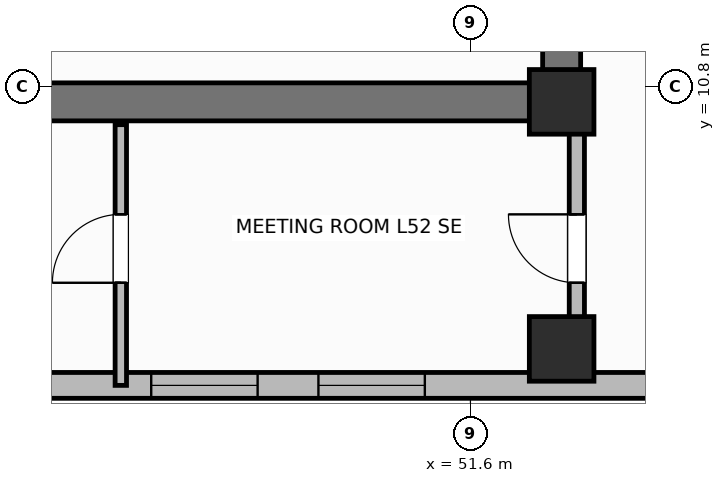
"""IFC4 building model, lengths in metres.
Left out: names, types, materials, properties, quantities, classifications, styles, units other than length and angle.
Written with IfcOpenShell. Run it as: python <this file> out.ifc"""

import sys

from ifc_helpers import new_model, si_unit, direction, frame, frame_2d, origin, origin_2d, place, context, subcontext, project, spatial, rectangle, extrude, element, fill, save


model = new_model("IFC4")
c1 = context("Model", 3, precision=1e-05, world=origin(), true_north=direction((0.0, 1.0)))
c2 = subcontext(c1, "Body", "Model", "MODEL_VIEW")
j1 = project(units=[si_unit("LENGTHUNIT", "METRE"), si_unit("PLANEANGLEUNIT", "RADIAN")], contexts=[c1])
p1 = place(None, origin())
s1 = spatial("IfcSite", under=j1, at=p1, CompositionType="ELEMENT")
p2 = place(p1, origin())
s2 = spatial("IfcBuilding", under=s1, at=p2, CompositionType="ELEMENT")
p3 = place(p2, frame((0.0, 0.0, 211.0)))
s3 = spatial("IfcBuildingStorey", under=s2, at=p3, CompositionType="ELEMENT", Elevation=211.0)
p4 = place(p3, frame((52.8, 10.6, 0.0), z_axis=(0.0, 0.0, 1.0), x_axis=(-1.0, 0.0, 0.0)))
e1 = element("IfcWall", 1, at=p4, inside=s3, PredefinedType="SHEAR", context=c2, shape_type="SweptSolid", body=[
    extrude(rectangle(XDim=27.2, YDim=0.5, at=frame_2d((13.6, 0.0))), origin(), (0.0, 0.0, 1.0), 3.7),
])
p5 = place(p3, frame((52.8, 10.85, 0.0), z_axis=(0.0, 0.0, 1.0), x_axis=(0.0, 1.0, 0.0)))
e2 = element("IfcWall", 2, at=p5, inside=s3, PredefinedType="SHEAR", context=c2, shape_type="SweptSolid", body=[
    extrude(rectangle(XDim=5.7, YDim=0.5, at=frame_2d((2.85, 0.0))), origin(), (0.0, 0.0, 1.0), 3.7),
])
for number, where, z_axis, x_axis in (
    (3, (52.8, 10.6, 0.0), (0.0, 0.0, 1.0), (1.0, 0.0, 0.0)),
    (4, (52.8, 7.35, 0.0), (0.0, 0.0, 1.0), (1.0, 0.0, 0.0)),
):
    element("IfcColumn", number, at=place(p3, frame(where, z_axis=z_axis, x_axis=x_axis)), inside=s3, PredefinedType="COLUMN", context=c2, shape_type="SweptSolid", body=[
        extrude(rectangle(XDim=0.85, YDim=0.85, at=origin_2d()), origin(), (0.0, 0.0, 1.0), 3.7),
    ])
p6 = place(p3, frame((42.4, 6.87, 0.0), z_axis=(0.0, 0.0, 1.0), x_axis=(1.0, 0.0, 0.0)))
e5 = element("IfcWall", 5, at=p6, inside=s3, PredefinedType="SOLIDWALL", context=c2, shape_type="SweptSolid", body=[
    extrude(rectangle(XDim=15.8, YDim=0.34, at=frame_2d((7.9, 0.0))), origin(), (0.0, 0.0, 1.0), 2.72),
])
p7 = place(p6, frame((2.1, 0.0, 0.75)))
e6 = element("IfcOpeningElement", 6, at=p7, cuts=e5, PredefinedType="OPENING", context=c2, shape_type="SweptSolid", body=[
    extrude(rectangle(XDim=1.4, YDim=1.85, at=frame_2d((0.7, 0.925))), frame((0.0, 0.18, 0.0), z_axis=(0.0, -1.0, 0.0), x_axis=(1.0, 0.0, 0.0)), (0.0, 0.0, 1.0), 0.36),
])
p8 = place(p6, frame((5.0, 0.0, 0.75)))
e7 = element("IfcOpeningElement", 7, at=p8, cuts=e5, PredefinedType="OPENING", context=c2, shape_type="SweptSolid", body=[
    extrude(rectangle(XDim=1.4, YDim=1.85, at=frame_2d((0.7, 0.925))), frame((0.0, 0.18, 0.0), z_axis=(0.0, -1.0, 0.0), x_axis=(1.0, 0.0, 0.0)), (0.0, 0.0, 1.0), 0.36),
])
p9 = place(p6, frame((7.2, 0.0, 0.75)))
e8 = element("IfcOpeningElement", 8, at=p9, cuts=e5, PredefinedType="OPENING", context=c2, shape_type="SweptSolid", body=[
    extrude(rectangle(XDim=1.4, YDim=1.85, at=frame_2d((0.7, 0.925))), frame((0.0, 0.18, 0.0), z_axis=(0.0, -1.0, 0.0), x_axis=(1.0, 0.0, 0.0)), (0.0, 0.0, 1.0), 0.36),
])
p10 = place(p6, frame((13.0, 0.0, 0.75)))
e9 = element("IfcOpeningElement", 9, at=p10, cuts=e5, PredefinedType="OPENING", context=c2, shape_type="SweptSolid", body=[
    extrude(rectangle(XDim=1.4, YDim=1.85, at=frame_2d((0.7, 0.925))), frame((0.0, 0.18, 0.0), z_axis=(0.0, -1.0, 0.0), x_axis=(1.0, 0.0, 0.0)), (0.0, 0.0, 1.0), 0.36),
])
p11 = place(p3, frame((47.0, 6.87, 0.0), z_axis=(0.0, 0.0, 1.0), x_axis=(0.0, 1.0, 0.0)))
e10 = element("IfcWall", 10, at=p11, inside=s3, PredefinedType="PARTITIONING", context=c2, shape_type="SweptSolid", body=[
    extrude(rectangle(XDim=3.43, YDim=0.15, at=frame_2d((1.715, 0.0))), origin(), (0.0, 0.0, 1.0), 2.55),
])
p12 = place(p11, frame((1.35, 0.0, 0.0)))
e11 = element("IfcOpeningElement", 11, at=p12, cuts=e10, PredefinedType="OPENING", context=c2, shape_type="SweptSolid", body=[
    extrude(rectangle(XDim=0.9, YDim=2.1, at=frame_2d((0.45, 1.05))), frame((0.0, 0.085, 0.0), z_axis=(0.0, -1.0, 0.0), x_axis=(1.0, 0.0, 0.0)), (0.0, 0.0, 1.0), 0.17),
])
p13 = place(p3, frame((53.0, 7.57, 0.0), z_axis=(0.0, 0.0, 1.0), x_axis=(0.0, 1.0, 0.0)))
e12 = element("IfcWall", 12, at=p13, inside=s3, PredefinedType="PARTITIONING", context=c2, shape_type="SweptSolid", body=[
    extrude(rectangle(XDim=2.73, YDim=0.2, at=frame_2d((1.365, 0.0))), origin(), (0.0, 0.0, 1.0), 2.55),
])
p14 = place(p13, frame((0.65, 0.0, 0.0)))
e13 = element("IfcOpeningElement", 13, at=p14, cuts=e12, PredefinedType="OPENING", context=c2, shape_type="SweptSolid", body=[
    extrude(rectangle(XDim=0.9, YDim=2.1, at=frame_2d((0.45, 1.05))), frame((0.0, 0.11, 0.0), z_axis=(0.0, -1.0, 0.0), x_axis=(1.0, 0.0, 0.0)), (0.0, 0.0, 1.0), 0.22),
])
p15 = place(p8, origin())
e14 = element("IfcWindow", 14, at=p15, inside=s3, PartitioningType="SINGLE_PANEL", PredefinedType="WINDOW", context=c2, shape_type="SweptSolid", body=[
    extrude(rectangle(XDim=1.4, YDim=1.85, at=frame_2d((0.7, 0.925))), frame((0.0, 0.03, 0.0), z_axis=(0.0, -1.0, 0.0), x_axis=(1.0, 0.0, 0.0)), (0.0, 0.0, 1.0), 0.06),
])
fill(e7, e14)
p16 = place(p9, origin())
e15 = element("IfcWindow", 15, at=p16, inside=s3, PartitioningType="SINGLE_PANEL", PredefinedType="WINDOW", context=c2, shape_type="SweptSolid", body=[
    extrude(rectangle(XDim=1.4, YDim=1.85, at=frame_2d((0.7, 0.925))), frame((0.0, 0.03, 0.0), z_axis=(0.0, -1.0, 0.0), x_axis=(1.0, 0.0, 0.0)), (0.0, 0.0, 1.0), 0.06),
])
fill(e8, e15)
p17 = place(p12, origin())
e16 = element("IfcDoor", 16, at=p17, inside=s3, OperationType="SINGLE_SWING_LEFT", PredefinedType="DOOR", context=c2, shape_type="SweptSolid", body=[
    extrude(rectangle(XDim=0.9, YDim=2.1, at=frame_2d((0.45, 1.05))), frame((0.0, 0.025, 0.0), z_axis=(0.0, -1.0, 0.0), x_axis=(1.0, 0.0, 0.0)), (0.0, 0.0, 1.0), 0.05),
])
fill(e11, e16)
p18 = place(p14, origin())
e17 = element("IfcDoor", 17, at=p18, inside=s3, OperationType="SINGLE_SWING_RIGHT", PredefinedType="DOOR", context=c2, shape_type="SweptSolid", body=[
    extrude(rectangle(XDim=0.9, YDim=2.1, at=frame_2d((0.45, 1.05))), frame((0.0, 0.025, 0.0), z_axis=(0.0, -1.0, 0.0), x_axis=(1.0, 0.0, 0.0)), (0.0, 0.0, 1.0), 0.05),
])
fill(e13, e17)
save(model, sys.argv[1])
